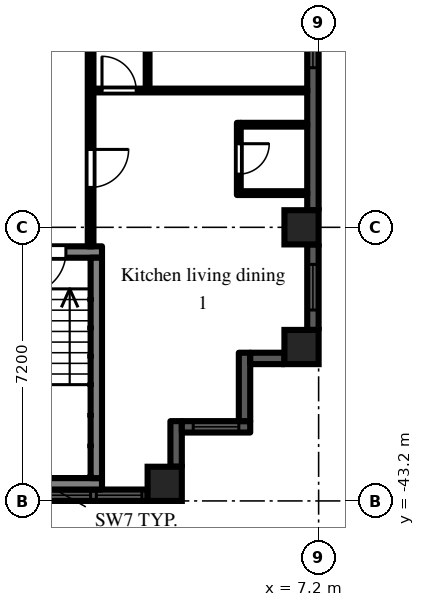
"""IFC4 building model, lengths in metres.
Left out: names, types, materials, properties, quantities, classifications, styles, units other than length and angle.
Written with IfcOpenShell. Run it as: python <this file> out.ifc"""

import sys

from ifc_helpers import new_model, si_unit, direction, frame, frame_2d, origin, origin_2d, place, context, subcontext, project, spatial, rectangle, extrude, element, fill, save


model = new_model("IFC4")
c1 = context("Model", 3, precision=1e-05, world=origin(), true_north=direction((0.0, 1.0)))
c2 = subcontext(c1, "Body", "Model", "MODEL_VIEW")
j1 = project(units=[si_unit("LENGTHUNIT", "METRE"), si_unit("PLANEANGLEUNIT", "RADIAN")], contexts=[c1])
p1 = place(None, origin())
s1 = spatial("IfcSite", under=j1, at=p1, CompositionType="ELEMENT")
p2 = place(p1, origin())
s2 = spatial("IfcBuilding", under=s1, at=p2, CompositionType="ELEMENT")
p3 = place(p2, frame((0.0, 0.0, 102.9)))
s3 = spatial("IfcBuildingStorey", under=s2, at=p3, CompositionType="ELEMENT", Elevation=102.9)
for number, where, z_axis, x_axis in (
    (1, (3.15, -42.75, 0.0), (0.0, 0.0, 1.0), (1.0, 0.0, 0.0)),
    (2, (6.75, -39.15, 0.0), (0.0, 0.0, 1.0), (1.0, 0.0, 0.0)),
    (3, (6.75, -36.0, 0.0), (0.0, 0.0, 1.0), (1.0, 0.0, 0.0)),
):
    element("IfcColumn", number, at=place(p3, frame(where, z_axis=z_axis, x_axis=x_axis)), inside=s3, PredefinedType="COLUMN", context=c2, shape_type="SweptSolid", body=[
        extrude(rectangle(XDim=0.9, YDim=0.9, at=origin_2d()), origin(), (0.0, 0.0, 1.0), 3.0),
    ])
p4 = place(p3, frame((-2.7, -43.05, 0.0), z_axis=(0.0, 0.0, 1.0), x_axis=(1.0, 0.0, 0.0)))
e4 = element("IfcWall", 4, at=p4, inside=s3, PredefinedType="SOLIDWALL", context=c2, shape_type="SweptSolid", body=[
    extrude(rectangle(XDim=5.4, YDim=0.3, at=frame_2d((2.7, 0.0))), origin(), (0.0, 0.0, 1.0), 2.1),
])
p5 = place(p4, frame((1.5, 0.0, 0.2)))
e5 = element("IfcOpeningElement", 5, at=p5, cuts=e4, PredefinedType="OPENING", context=c2, shape_type="SweptSolid", body=[
    extrude(rectangle(XDim=2.4, YDim=1.85, at=frame_2d((1.2, 0.925))), frame((0.0, 0.16, 0.0), z_axis=(0.0, -1.0, 0.0), x_axis=(1.0, 0.0, 0.0)), (0.0, 0.0, 1.0), 0.32),
])
p6 = place(p4, frame((0.15, 0.0, 0.2)))
e6 = element("IfcOpeningElement", 6, at=p6, cuts=e4, PredefinedType="OPENING", context=c2, shape_type="SweptSolid", body=[
    extrude(rectangle(XDim=1.2, YDim=1.85, at=frame_2d((0.6, 0.925))), frame((0.0, 0.16, 0.0), z_axis=(0.0, -1.0, 0.0), x_axis=(1.0, 0.0, 0.0)), (0.0, 0.0, 1.0), 0.32),
])
p7 = place(p4, frame((4.05, 0.0, 0.2)))
e7 = element("IfcOpeningElement", 7, at=p7, cuts=e4, PredefinedType="OPENING", context=c2, shape_type="SweptSolid", body=[
    extrude(rectangle(XDim=1.2, YDim=1.85, at=frame_2d((0.6, 0.925))), frame((0.0, 0.16, 0.0), z_axis=(0.0, -1.0, 0.0), x_axis=(1.0, 0.0, 0.0)), (0.0, 0.0, 1.0), 0.32),
])
p8 = place(p3, frame((3.45, -42.3, 0.0), z_axis=(0.0, 0.0, 1.0), x_axis=(0.0, 1.0, 0.0)))
e8 = element("IfcWall", 8, at=p8, inside=s3, PredefinedType="SOLIDWALL", context=c2, shape_type="SweptSolid", body=[
    extrude(rectangle(XDim=1.2, YDim=0.3, at=frame_2d((0.6, 0.0))), origin(), (0.0, 0.0, 1.0), 2.575),
])
p9 = place(p3, frame((3.6, -41.25, 0.0), z_axis=(0.0, 0.0, 1.0), x_axis=(1.0, 0.0, 0.0)))
e9 = element("IfcWall", 9, at=p9, inside=s3, PredefinedType="SOLIDWALL", context=c2, shape_type="SweptSolid", body=[
    extrude(rectangle(XDim=1.8, YDim=0.3, at=frame_2d((0.9, 0.0))), origin(), (0.0, 0.0, 1.0), 2.575),
])
p10 = place(p9, frame((0.3, 0.0, 0.2)))
e10 = element("IfcOpeningElement", 10, at=p10, cuts=e9, PredefinedType="OPENING", context=c2, shape_type="SweptSolid", body=[
    extrude(rectangle(XDim=1.2, YDim=1.85, at=frame_2d((0.6, 0.925))), frame((0.0, 0.16, 0.0), z_axis=(0.0, -1.0, 0.0), x_axis=(1.0, 0.0, 0.0)), (0.0, 0.0, 1.0), 0.32),
])
p11 = place(p3, frame((5.25, -41.1, 0.0), z_axis=(0.0, 0.0, 1.0), x_axis=(0.0, 1.0, 0.0)))
e11 = element("IfcWall", 11, at=p11, inside=s3, PredefinedType="SOLIDWALL", context=c2, shape_type="SweptSolid", body=[
    extrude(rectangle(XDim=1.8, YDim=0.3, at=frame_2d((0.9, 0.0))), origin(), (0.0, 0.0, 1.0), 2.575),
])
p12 = place(p3, frame((5.4, -39.45, 0.0), z_axis=(0.0, 0.0, 1.0), x_axis=(1.0, 0.0, 0.0)))
e12 = element("IfcWall", 12, at=p12, inside=s3, PredefinedType="SOLIDWALL", context=c2, shape_type="SweptSolid", body=[
    extrude(rectangle(XDim=0.9, YDim=0.3, at=frame_2d((0.45, 0.0))), origin(), (0.0, 0.0, 1.0), 2.575),
])
p13 = place(p3, frame((7.05, -38.7, 0.0), z_axis=(0.0, 0.0, 1.0), x_axis=(0.0, 1.0, 0.0)))
e13 = element("IfcWall", 13, at=p13, inside=s3, PredefinedType="SOLIDWALL", context=c2, shape_type="SweptSolid", body=[
    extrude(rectangle(XDim=2.25, YDim=0.3, at=frame_2d((1.125, 0.0))), origin(), (0.0, 0.0, 1.0), 2.1),
])
p14 = place(p13, frame((0.525, 0.0, 0.2)))
e14 = element("IfcOpeningElement", 14, at=p14, cuts=e13, PredefinedType="OPENING", context=c2, shape_type="SweptSolid", body=[
    extrude(rectangle(XDim=1.2, YDim=1.85, at=frame_2d((0.6, 0.925))), frame((0.0, 0.16, 0.0), z_axis=(0.0, -1.0, 0.0), x_axis=(1.0, 0.0, 0.0)), (0.0, 0.0, 1.0), 0.32),
])
p15 = place(p3, frame((7.05, -35.55, 0.0), z_axis=(0.0, 0.0, 1.0), x_axis=(0.0, 1.0, 0.0)))
e15 = element("IfcWall", 15, at=p15, inside=s3, PredefinedType="SOLIDWALL", context=c2, shape_type="SweptSolid", body=[
    extrude(rectangle(XDim=6.3, YDim=0.3, at=frame_2d((3.15, 0.0))), origin(), (0.0, 0.0, 1.0), 2.1),
])
p16 = place(p15, frame((3.75, 0.0, 0.2)))
e16 = element("IfcOpeningElement", 16, at=p16, cuts=e15, PredefinedType="OPENING", context=c2, shape_type="SweptSolid", body=[
    extrude(rectangle(XDim=2.4, YDim=1.85, at=frame_2d((1.2, 0.925))), frame((0.0, 0.16, 0.0), z_axis=(0.0, -1.0, 0.0), x_axis=(1.0, 0.0, 0.0)), (0.0, 0.0, 1.0), 0.32),
])
p17 = place(p3, frame((-1.5, -36.65, 0.0), z_axis=(0.0, 0.0, 1.0), x_axis=(1.0, 0.0, 0.0)))
e17 = element("IfcWall", 17, at=p17, inside=s3, PredefinedType="SHEAR", context=c2, shape_type="SweptSolid", body=[
    extrude(rectangle(XDim=3.0, YDim=0.3, at=frame_2d((1.5, 0.0))), origin(), (0.0, 0.0, 1.0), 2.575),
])
p18 = place(p17, frame((0.95, 0.0, 0.0)))
e18 = element("IfcOpeningElement", 18, at=p18, cuts=e17, PredefinedType="OPENING", context=c2, shape_type="SweptSolid", body=[
    extrude(rectangle(XDim=1.1, YDim=2.1, at=frame_2d((0.55, 1.05))), frame((0.0, 0.16, 0.0), z_axis=(0.0, -1.0, 0.0), x_axis=(1.0, 0.0, 0.0)), (0.0, 0.0, 1.0), 0.32),
])
p19 = place(p3, frame((-1.5, -42.75, 0.0), z_axis=(0.0, 0.0, 1.0), x_axis=(1.0, 0.0, 0.0)))
e19 = element("IfcWall", 19, at=p19, inside=s3, PredefinedType="SHEAR", context=c2, shape_type="SweptSolid", body=[
    extrude(rectangle(XDim=3.0, YDim=0.3, at=frame_2d((1.5, 0.0))), origin(), (0.0, 0.0, 1.0), 2.575),
])
p20 = place(p3, frame((1.35, -36.8, 0.0), z_axis=(0.0, 0.0, 1.0), x_axis=(0.0, -1.0, 0.0)))
e20 = element("IfcWall", 20, at=p20, inside=s3, PredefinedType="SHEAR", context=c2, shape_type="SweptSolid", body=[
    extrude(rectangle(XDim=5.8, YDim=0.3, at=frame_2d((2.9, 0.0))), origin(), (0.0, 0.0, 1.0), 2.575),
])
p21 = place(p3, frame((1.2, -36.5, 0.0), z_axis=(0.0, 0.0, 1.0), x_axis=(0.0, 1.0, 0.0)))
e21 = element("IfcWall", 21, at=p21, inside=s3, PredefinedType="PARTITIONING", context=c2, shape_type="SweptSolid", body=[
    extrude(rectangle(XDim=35.375, YDim=0.15, at=frame_2d((17.688, 0.0))), origin(), (0.0, 0.0, 1.0), 2.575),
])
p22 = place(p21, frame((33.65, 0.0, 0.0)))
e22 = element("IfcOpeningElement", 22, at=p22, cuts=e21, PredefinedType="OPENING", context=c2, shape_type="SweptSolid", body=[
    extrude(rectangle(XDim=0.9, YDim=2.1, at=frame_2d((0.45, 1.05))), frame((0.0, 0.085, 0.0), z_axis=(0.0, -1.0, 0.0), x_axis=(1.0, 0.0, 0.0)), (0.0, 0.0, 1.0), 0.17),
])
p23 = place(p21, frame((30.65, 0.0, 0.0)))
e23 = element("IfcOpeningElement", 23, at=p23, cuts=e21, PredefinedType="OPENING", context=c2, shape_type="SweptSolid", body=[
    extrude(rectangle(XDim=0.9, YDim=2.1, at=frame_2d((0.45, 1.05))), frame((0.0, 0.085, 0.0), z_axis=(0.0, -1.0, 0.0), x_axis=(1.0, 0.0, 0.0)), (0.0, 0.0, 1.0), 0.17),
])
p24 = place(p21, frame((23.45, 0.0, 0.0)))
e24 = element("IfcOpeningElement", 24, at=p24, cuts=e21, PredefinedType="OPENING", context=c2, shape_type="SweptSolid", body=[
    extrude(rectangle(XDim=0.9, YDim=2.1, at=frame_2d((0.45, 1.05))), frame((0.0, 0.085, 0.0), z_axis=(0.0, -1.0, 0.0), x_axis=(1.0, 0.0, 0.0)), (0.0, 0.0, 1.0), 0.17),
])
p25 = place(p21, frame((20.75, 0.0, 0.0)))
e25 = element("IfcOpeningElement", 25, at=p25, cuts=e21, PredefinedType="OPENING", context=c2, shape_type="SweptSolid", body=[
    extrude(rectangle(XDim=0.9, YDim=2.1, at=frame_2d((0.45, 1.05))), frame((0.0, 0.085, 0.0), z_axis=(0.0, -1.0, 0.0), x_axis=(1.0, 0.0, 0.0)), (0.0, 0.0, 1.0), 0.17),
])
p26 = place(p21, frame((18.95, 0.0, 0.0)))
e26 = element("IfcOpeningElement", 26, at=p26, cuts=e21, PredefinedType="OPENING", context=c2, shape_type="SweptSolid", body=[
    extrude(rectangle(XDim=0.9, YDim=2.1, at=frame_2d((0.45, 1.05))), frame((0.0, 0.085, 0.0), z_axis=(0.0, -1.0, 0.0), x_axis=(1.0, 0.0, 0.0)), (0.0, 0.0, 1.0), 0.17),
])
p27 = place(p21, frame((1.55, 0.0, 0.0)))
e27 = element("IfcOpeningElement", 27, at=p27, cuts=e21, PredefinedType="OPENING", context=c2, shape_type="SweptSolid", body=[
    extrude(rectangle(XDim=1.0, YDim=2.1, at=frame_2d((0.5, 1.05))), frame((0.0, 0.085, 0.0), z_axis=(0.0, -1.0, 0.0), x_axis=(1.0, 0.0, 0.0)), (0.0, 0.0, 1.0), 0.17),
])
p28 = place(p3, frame((1.275, -32.4, 0.0), z_axis=(0.0, 0.0, 1.0), x_axis=(1.0, 0.0, 0.0)))
e28 = element("IfcWall", 28, at=p28, inside=s3, PredefinedType="PARTITIONING", context=c2, shape_type="SweptSolid", body=[
    extrude(rectangle(XDim=5.625, YDim=0.1, at=frame_2d((2.812, 0.0))), origin(), (0.0, 0.0, 1.0), 2.575),
])
p29 = place(p28, frame((0.225, 0.0, 0.0)))
e29 = element("IfcOpeningElement", 29, at=p29, cuts=e28, PredefinedType="OPENING", context=c2, shape_type="SweptSolid", body=[
    extrude(rectangle(XDim=0.9, YDim=2.1, at=frame_2d((0.45, 1.05))), frame((0.0, 0.06, 0.0), z_axis=(0.0, -1.0, 0.0), x_axis=(1.0, 0.0, 0.0)), (0.0, 0.0, 1.0), 0.12),
])
p30 = place(p3, frame((2.7, -32.35, 0.0), z_axis=(0.0, 0.0, 1.0), x_axis=(0.0, 1.0, 0.0)))
e30 = element("IfcWall", 30, at=p30, inside=s3, PredefinedType="PARTITIONING", context=c2, shape_type="SweptSolid", body=[
    extrude(rectangle(XDim=14.275, YDim=0.1, at=frame_2d((7.138, 0.0))), origin(), (0.0, 0.0, 1.0), 2.575),
])
p31 = place(p30, frame((1.12, 0.0, 0.0)))
e31 = element("IfcOpeningElement", 31, at=p31, cuts=e30, PredefinedType="OPENING", context=c2, shape_type="SweptSolid", body=[
    extrude(rectangle(XDim=0.9, YDim=2.1, at=frame_2d((0.45, 1.05))), frame((0.0, 0.06, 0.0), z_axis=(0.0, -1.0, 0.0), x_axis=(1.0, 0.0, 0.0)), (0.0, 0.0, 1.0), 0.12),
])
p32 = place(p30, frame((12.28, 0.0, 0.0)))
e32 = element("IfcOpeningElement", 32, at=p32, cuts=e30, PredefinedType="OPENING", context=c2, shape_type="SweptSolid", body=[
    extrude(rectangle(XDim=0.9, YDim=2.1, at=frame_2d((0.45, 1.05))), frame((0.0, 0.06, 0.0), z_axis=(0.0, -1.0, 0.0), x_axis=(1.0, 0.0, 0.0)), (0.0, 0.0, 1.0), 0.12),
])
p33 = place(p3, frame((5.1, -35.15, 0.0), z_axis=(0.0, 0.0, 1.0), x_axis=(0.0, 1.0, 0.0)))
e33 = element("IfcWall", 33, at=p33, inside=s3, PredefinedType="PARTITIONING", context=c2, shape_type="SweptSolid", body=[
    extrude(rectangle(XDim=1.9, YDim=0.1, at=frame_2d((0.95, 0.0))), origin(), (0.0, 0.0, 1.0), 2.575),
])
p34 = place(p33, frame((0.55, 0.0, 0.0)))
e34 = element("IfcOpeningElement", 34, at=p34, cuts=e33, PredefinedType="OPENING", context=c2, shape_type="SweptSolid", body=[
    extrude(rectangle(XDim=0.8, YDim=2.1, at=frame_2d((0.4, 1.05))), frame((0.0, 0.06, 0.0), z_axis=(0.0, -1.0, 0.0), x_axis=(1.0, 0.0, 0.0)), (0.0, 0.0, 1.0), 0.12),
])
for number, where, z_axis, x_axis in (
    (35, (5.15, -35.1, 0.0), (0.0, 0.0, 1.0), (1.0, 0.0, 0.0)),
    (36, (5.15, -33.3, 0.0), (0.0, 0.0, 1.0), (1.0, 0.0, 0.0)),
):
    element("IfcWall", number, at=place(p3, frame(where, z_axis=z_axis, x_axis=x_axis)), inside=s3, PredefinedType="PARTITIONING", context=c2, shape_type="SweptSolid", body=[
        extrude(rectangle(XDim=1.75, YDim=0.1, at=frame_2d((0.875, 0.0))), origin(), (0.0, 0.0, 1.0), 2.575),
    ])
p35 = place(p5, origin())
e37 = element("IfcWindow", 37, at=p35, inside=s3, PartitioningType="SINGLE_PANEL", PredefinedType="WINDOW", context=c2, shape_type="SweptSolid", body=[
    extrude(rectangle(XDim=2.4, YDim=1.85, at=frame_2d((1.2, 0.925))), frame((0.0, 0.03, 0.0), z_axis=(0.0, -1.0, 0.0), x_axis=(1.0, 0.0, 0.0)), (0.0, 0.0, 1.0), 0.06),
])
fill(e5, e37)
p36 = place(p7, origin())
e38 = element("IfcWindow", 38, at=p36, inside=s3, PartitioningType="SINGLE_PANEL", PredefinedType="WINDOW", context=c2, shape_type="SweptSolid", body=[
    extrude(rectangle(XDim=1.2, YDim=1.85, at=frame_2d((0.6, 0.925))), frame((0.0, 0.03, 0.0), z_axis=(0.0, -1.0, 0.0), x_axis=(1.0, 0.0, 0.0)), (0.0, 0.0, 1.0), 0.06),
])
fill(e7, e38)
p37 = place(p10, origin())
e39 = element("IfcWindow", 39, at=p37, inside=s3, PartitioningType="SINGLE_PANEL", PredefinedType="WINDOW", context=c2, shape_type="SweptSolid", body=[
    extrude(rectangle(XDim=1.2, YDim=1.85, at=frame_2d((0.6, 0.925))), frame((0.0, 0.03, 0.0), z_axis=(0.0, -1.0, 0.0), x_axis=(1.0, 0.0, 0.0)), (0.0, 0.0, 1.0), 0.06),
])
fill(e10, e39)
p38 = place(p14, origin())
e40 = element("IfcWindow", 40, at=p38, inside=s3, PartitioningType="SINGLE_PANEL", PredefinedType="WINDOW", context=c2, shape_type="SweptSolid", body=[
    extrude(rectangle(XDim=1.2, YDim=1.85, at=frame_2d((0.6, 0.925))), frame((0.0, 0.03, 0.0), z_axis=(0.0, -1.0, 0.0), x_axis=(1.0, 0.0, 0.0)), (0.0, 0.0, 1.0), 0.06),
])
fill(e14, e40)
p39 = place(p16, origin())
e41 = element("IfcWindow", 41, at=p39, inside=s3, PartitioningType="SINGLE_PANEL", PredefinedType="WINDOW", context=c2, shape_type="SweptSolid", body=[
    extrude(rectangle(XDim=2.4, YDim=1.85, at=frame_2d((1.2, 0.925))), frame((0.0, 0.03, 0.0), z_axis=(0.0, -1.0, 0.0), x_axis=(1.0, 0.0, 0.0)), (0.0, 0.0, 1.0), 0.06),
])
fill(e16, e41)
p40 = place(p18, frame((1.1, 0.0, 0.0), z_axis=(0.0, 0.0, 1.0), x_axis=(-1.0, 0.0, 0.0)))
e42 = element("IfcDoor", 42, at=p40, inside=s3, OperationType="SINGLE_SWING_RIGHT", PredefinedType="DOOR", context=c2, shape_type="SweptSolid", body=[
    extrude(rectangle(XDim=1.1, YDim=2.1, at=frame_2d((0.55, 1.05))), frame((0.0, 0.025, 0.0), z_axis=(0.0, -1.0, 0.0), x_axis=(1.0, 0.0, 0.0)), (0.0, 0.0, 1.0), 0.05),
])
fill(e18, e42)
p41 = place(p34, frame((0.8, 0.0, 0.0), z_axis=(0.0, 0.0, 1.0), x_axis=(-1.0, 0.0, 0.0)))
e43 = element("IfcDoor", 43, at=p41, inside=s3, OperationType="SINGLE_SWING_LEFT", PredefinedType="DOOR", context=c2, shape_type="SweptSolid", body=[
    extrude(rectangle(XDim=0.8, YDim=2.1, at=frame_2d((0.4, 1.05))), frame((0.0, 0.025, 0.0), z_axis=(0.0, -1.0, 0.0), x_axis=(1.0, 0.0, 0.0)), (0.0, 0.0, 1.0), 0.05),
])
fill(e34, e43)
p42 = place(p27, frame((1.0, 0.0, 0.0), z_axis=(0.0, 0.0, 1.0), x_axis=(-1.0, 0.0, 0.0)))
e44 = element("IfcDoor", 44, at=p42, inside=s3, OperationType="SINGLE_SWING_LEFT", PredefinedType="DOOR", context=c2, shape_type="SweptSolid", body=[
    extrude(rectangle(XDim=1.0, YDim=2.1, at=frame_2d((0.5, 1.05))), frame((0.0, 0.025, 0.0), z_axis=(0.0, -1.0, 0.0), x_axis=(1.0, 0.0, 0.0)), (0.0, 0.0, 1.0), 0.05),
])
fill(e27, e44)
p43 = place(p29, origin())
e45 = element("IfcDoor", 45, at=p43, inside=s3, OperationType="SINGLE_SWING_LEFT", PredefinedType="DOOR", context=c2, shape_type="SweptSolid", body=[
    extrude(rectangle(XDim=0.9, YDim=2.1, at=frame_2d((0.45, 1.05))), frame((0.0, 0.025, 0.0), z_axis=(0.0, -1.0, 0.0), x_axis=(1.0, 0.0, 0.0)), (0.0, 0.0, 1.0), 0.05),
])
fill(e29, e45)
save(model, sys.argv[1])
